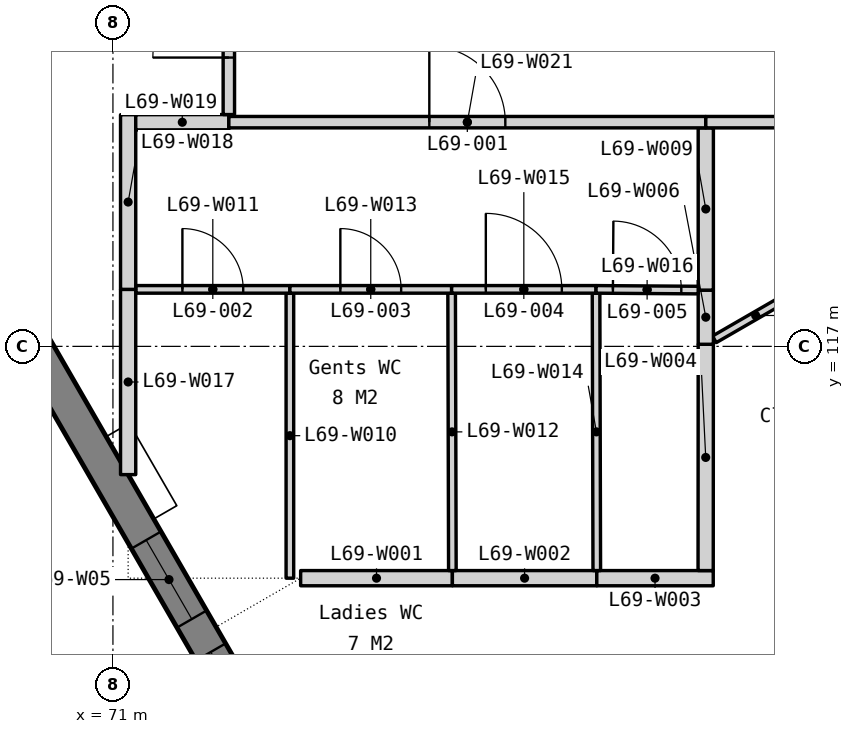
"""IFC4 building model, lengths in metres.
Left out: names, types, materials, properties, quantities, classifications, styles, units other than length and angle.
Written with IfcOpenShell. Run it as: python <this file> out.ifc"""

import sys

from ifc_helpers import new_model, si_unit, direction, frame, frame_2d, origin, place, context, subcontext, project, spatial, polyline, rectangle, outline, extrude, element, fill, save


model = new_model("IFC4")
c1 = context("Model", 3, precision=1e-05, world=origin(), true_north=direction((0.0, 1.0)))
c2 = subcontext(c1, "Body", "Model", "MODEL_VIEW")
j1 = project(units=[si_unit("LENGTHUNIT", "METRE"), si_unit("PLANEANGLEUNIT", "RADIAN")], contexts=[c1])
p1 = place(None, origin())
s1 = spatial("IfcSite", under=j1, at=p1, CompositionType="ELEMENT")
p2 = place(p1, origin())
s2 = spatial("IfcBuilding", under=s1, at=p2, CompositionType="ELEMENT")
p3 = place(p2, frame((0.0, 0.0, 281.6)))
s3 = spatial("IfcBuildingStorey", under=s2, at=p3, CompositionType="ELEMENT", Elevation=281.6)
p4 = place(p3, frame((60.609, 133.207, -0.15), z_axis=(0.0, 0.0, 1.0), x_axis=(0.500002536638, -0.866023939251, 0.0)))
e1 = element("IfcWall", 1, at=p4, inside=s3, PredefinedType="SOLIDWALL", context=c2, shape_type="SweptSolid", body=[
    extrude(outline(polyline([(36.972, 0.0), (36.972, 3.55), (0.0, 3.55), (0.0, 0.0), (36.972, 0.0)])), frame((0.0, 0.225, 0.0), z_axis=(0.0, -1.0, 0.0), x_axis=(1.0, 0.0, 0.0)), (0.0, 0.0, 1.0), 0.45),
])
p5 = place(p4, frame((3.172, 0.0, 0.95)))
e2 = element("IfcOpeningElement", 2, at=p5, cuts=e1, PredefinedType="OPENING", context=c2, shape_type="SweptSolid", body=[
    extrude(rectangle(XDim=1.2, YDim=2.2, at=frame_2d((0.6, 1.1))), frame((0.0, 0.235, 0.0), z_axis=(0.0, -1.0, 0.0), x_axis=(1.0, 0.0, 0.0)), (0.0, 0.0, 1.0), 0.47),
])
p6 = place(p4, frame((4.872, 0.0, 0.95)))
e3 = element("IfcOpeningElement", 3, at=p6, cuts=e1, PredefinedType="OPENING", context=c2, shape_type="SweptSolid", body=[
    extrude(rectangle(XDim=1.2, YDim=2.2, at=frame_2d((0.6, 1.1))), frame((0.0, 0.235, 0.0), z_axis=(0.0, -1.0, 0.0), x_axis=(1.0, 0.0, 0.0)), (0.0, 0.0, 1.0), 0.47),
])
p7 = place(p4, frame((12.415, 0.0, 0.95)))
e4 = element("IfcOpeningElement", 4, at=p7, cuts=e1, PredefinedType="OPENING", context=c2, shape_type="SweptSolid", body=[
    extrude(rectangle(XDim=1.2, YDim=2.2, at=frame_2d((0.6, 1.1))), frame((0.0, 0.235, 0.0), z_axis=(0.0, -1.0, 0.0), x_axis=(1.0, 0.0, 0.0)), (0.0, 0.0, 1.0), 0.47),
])
p8 = place(p4, frame((14.115, 0.0, 0.95)))
e5 = element("IfcOpeningElement", 5, at=p8, cuts=e1, PredefinedType="OPENING", context=c2, shape_type="SweptSolid", body=[
    extrude(rectangle(XDim=1.2, YDim=2.2, at=frame_2d((0.6, 1.1))), frame((0.0, 0.235, 0.0), z_axis=(0.0, -1.0, 0.0), x_axis=(1.0, 0.0, 0.0)), (0.0, 0.0, 1.0), 0.47),
])
p9 = place(p4, frame((21.658, 0.0, 0.95)))
e6 = element("IfcOpeningElement", 6, at=p9, cuts=e1, PredefinedType="OPENING", context=c2, shape_type="SweptSolid", body=[
    extrude(rectangle(XDim=1.2, YDim=2.2, at=frame_2d((0.6, 1.1))), frame((0.0, 0.235, 0.0), z_axis=(0.0, -1.0, 0.0), x_axis=(1.0, 0.0, 0.0)), (0.0, 0.0, 1.0), 0.47),
])
p10 = place(p4, frame((23.358, 0.0, 0.95)))
e7 = element("IfcOpeningElement", 7, at=p10, cuts=e1, PredefinedType="OPENING", context=c2, shape_type="SweptSolid", body=[
    extrude(rectangle(XDim=1.2, YDim=2.2, at=frame_2d((0.6, 1.1))), frame((0.0, 0.235, 0.0), z_axis=(0.0, -1.0, 0.0), x_axis=(1.0, 0.0, 0.0)), (0.0, 0.0, 1.0), 0.47),
])
p11 = place(p4, frame((30.901, 0.0, 0.95)))
e8 = element("IfcOpeningElement", 8, at=p11, cuts=e1, PredefinedType="OPENING", context=c2, shape_type="SweptSolid", body=[
    extrude(rectangle(XDim=1.2, YDim=2.2, at=frame_2d((0.6, 1.1))), frame((0.0, 0.235, 0.0), z_axis=(0.0, -1.0, 0.0), x_axis=(1.0, 0.0, 0.0)), (0.0, 0.0, 1.0), 0.47),
])
p12 = place(p4, frame((32.601, 0.0, 0.95)))
e9 = element("IfcOpeningElement", 9, at=p12, cuts=e1, PredefinedType="OPENING", context=c2, shape_type="SweptSolid", body=[
    extrude(rectangle(XDim=1.2, YDim=2.2, at=frame_2d((0.6, 1.1))), frame((0.0, 0.235, 0.0), z_axis=(0.0, -1.0, 0.0), x_axis=(1.0, 0.0, 0.0)), (0.0, 0.0, 1.0), 0.47),
])
p13 = place(p3, frame((73.47, 113.95, 0.0), z_axis=(0.0, 0.0, 1.0), x_axis=(1.0, 0.0, 0.0)))
e10 = element("IfcWall", 10, at=p13, inside=s3, PredefinedType="PARTITIONING", context=c2, shape_type="SweptSolid", body=[
    extrude(rectangle(XDim=1.996, YDim=0.2, at=frame_2d((0.998, 0.0))), origin(), (0.0, 0.0, 1.0), 3.5),
])
p14 = place(p3, frame((75.466, 113.95, 0.0), z_axis=(0.0, 0.0, 1.0), x_axis=(1.0, 0.0, 0.0)))
e11 = element("IfcWall", 11, at=p14, inside=s3, PredefinedType="PARTITIONING", context=c2, shape_type="SweptSolid", body=[
    extrude(rectangle(XDim=1.9, YDim=0.2, at=frame_2d((0.95, 0.0))), origin(), (0.0, 0.0, 1.0), 3.5),
])
p15 = place(p3, frame((77.366, 113.95, 0.0), z_axis=(0.0, 0.0, 1.0), x_axis=(1.0, 0.0, 0.0)))
e12 = element("IfcWall", 12, at=p15, inside=s3, PredefinedType="PARTITIONING", context=c2, shape_type="SweptSolid", body=[
    extrude(rectangle(XDim=1.532, YDim=0.2, at=frame_2d((0.766, 0.0))), origin(), (0.0, 0.0, 1.0), 3.5),
])
p16 = place(p3, frame((78.798, 114.05, 0.0), z_axis=(0.0, 0.0, 1.0), x_axis=(0.00065595263, 0.999999784863, 0.0)))
e13 = element("IfcWall", 13, at=p16, inside=s3, PredefinedType="PARTITIONING", context=c2, shape_type="SweptSolid", body=[
    extrude(rectangle(XDim=2.978, YDim=0.2, at=frame_2d((1.489, 0.0))), origin(), (0.0, 0.0, 1.0), 3.5),
])
p17 = place(p3, frame((78.913, 117.093, 0.0), z_axis=(0.0, 0.0, 1.0), x_axis=(0.866069023501, 0.499924440822, 0.0)))
e14 = element("IfcWall", 14, at=p17, inside=s3, PredefinedType="PARTITIONING", context=c2, shape_type="SweptSolid", body=[
    extrude(rectangle(XDim=1.256, YDim=0.1, at=frame_2d((0.628, 0.0))), origin(), (0.0, 0.0, 1.0), 3.5),
])
p18 = place(p3, frame((78.8, 117.028, 0.0), z_axis=(0.0, 0.0, 1.0), x_axis=(0.0, 1.0, 0.0)))
e15 = element("IfcWall", 15, at=p18, inside=s3, PredefinedType="PARTITIONING", context=c2, shape_type="SweptSolid", body=[
    extrude(rectangle(XDim=0.712, YDim=0.2, at=frame_2d((0.356, 0.0))), origin(), (0.0, 0.0, 1.0), 3.5),
])
p19 = place(p3, frame((78.8, 117.74, 0.0), z_axis=(0.0, 0.0, 1.0), x_axis=(0.0, 1.0, 0.0)))
e16 = element("IfcWall", 16, at=p19, inside=s3, PredefinedType="PARTITIONING", context=c2, shape_type="SweptSolid", body=[
    extrude(rectangle(XDim=2.135, YDim=0.2, at=frame_2d((1.067, 0.0))), origin(), (0.0, 0.0, 1.0), 3.5),
])
p20 = place(p3, frame((73.328, 113.95, 0.0), z_axis=(0.0, 0.0, 1.0), x_axis=(0.0, 1.0, 0.0)))
e17 = element("IfcWall", 17, at=p20, inside=s3, PredefinedType="PARTITIONING", context=c2, shape_type="SweptSolid", body=[
    extrude(rectangle(XDim=3.75, YDim=0.1, at=frame_2d((1.875, 0.0))), origin(), (0.0, 0.0, 1.0), 3.5),
])
p21 = place(p3, frame((71.3, 117.75, 0.0), z_axis=(0.0, 0.0, 1.0), x_axis=(1.0, 0.0, 0.0)))
e18 = element("IfcWall", 18, at=p21, inside=s3, PredefinedType="PARTITIONING", context=c2, shape_type="SweptSolid", body=[
    extrude(rectangle(XDim=2.028, YDim=0.1, at=frame_2d((1.014, 0.0))), origin(), (0.0, 0.0, 1.0), 3.5),
])
p22 = place(p21, frame((0.614, 0.0, 0.0)))
e19 = element("IfcOpeningElement", 19, at=p22, cuts=e18, PredefinedType="OPENING", context=c2, shape_type="SweptSolid", body=[
    extrude(rectangle(XDim=0.8, YDim=2.1, at=frame_2d((0.4, 1.05))), frame((0.0, 0.06, 0.0), z_axis=(0.0, -1.0, 0.0), x_axis=(1.0, 0.0, 0.0)), (0.0, 0.0, 1.0), 0.12),
])
p23 = place(p3, frame((75.466, 114.05, 0.0), z_axis=(0.0, 0.0, 1.0), x_axis=(-0.002675575707, 0.999996420641, 0.0)))
e20 = element("IfcWall", 20, at=p23, inside=s3, PredefinedType="PARTITIONING", context=c2, shape_type="SweptSolid", body=[
    extrude(rectangle(XDim=3.65, YDim=0.1, at=frame_2d((1.825, 0.0))), origin(), (0.0, 0.0, 1.0), 3.5),
])
p24 = place(p3, frame((73.328, 117.75, 0.0), z_axis=(0.0, 0.0, 1.0), x_axis=(1.0, 0.0, 0.0)))
e21 = element("IfcWall", 21, at=p24, inside=s3, PredefinedType="PARTITIONING", context=c2, shape_type="SweptSolid", body=[
    extrude(rectangle(XDim=2.128, YDim=0.1, at=frame_2d((1.064, 0.0))), origin(), (0.0, 0.0, 1.0), 3.5),
])
p25 = place(p24, frame((0.664, 0.0, 0.0)))
e22 = element("IfcOpeningElement", 22, at=p25, cuts=e21, PredefinedType="OPENING", context=c2, shape_type="SweptSolid", body=[
    extrude(rectangle(XDim=0.8, YDim=2.1, at=frame_2d((0.4, 1.05))), frame((0.0, 0.06, 0.0), z_axis=(0.0, -1.0, 0.0), x_axis=(1.0, 0.0, 0.0)), (0.0, 0.0, 1.0), 0.12),
])
p26 = place(p3, frame((77.366, 114.05, 0.0), z_axis=(0.0, 0.0, 1.0), x_axis=(-0.002608686776, 0.999996597371, 0.0)))
e23 = element("IfcWall", 23, at=p26, inside=s3, PredefinedType="PARTITIONING", context=c2, shape_type="SweptSolid", body=[
    extrude(rectangle(XDim=3.65, YDim=0.1, at=frame_2d((1.825, 0.0))), origin(), (0.0, 0.0, 1.0), 3.5),
])
p27 = place(p3, frame((75.456, 117.75, 0.0), z_axis=(0.0, 0.0, 1.0), x_axis=(1.0, 0.0, 0.0)))
e24 = element("IfcWall", 24, at=p27, inside=s3, PredefinedType="PARTITIONING", context=c2, shape_type="SweptSolid", body=[
    extrude(rectangle(XDim=1.9, YDim=0.1, at=frame_2d((0.95, 0.0))), origin(), (0.0, 0.0, 1.0), 3.5),
])
p28 = place(p27, frame((0.45, 0.0, 0.0)))
e25 = element("IfcOpeningElement", 25, at=p28, cuts=e24, PredefinedType="OPENING", context=c2, shape_type="SweptSolid", body=[
    extrude(rectangle(XDim=1.0, YDim=2.1, at=frame_2d((0.5, 1.05))), frame((0.0, 0.06, 0.0), z_axis=(0.0, -1.0, 0.0), x_axis=(1.0, 0.0, 0.0)), (0.0, 0.0, 1.0), 0.12),
])
p29 = place(p3, frame((77.356, 117.75, 0.0), z_axis=(0.0, 0.0, 1.0), x_axis=(0.99997617642, -0.006902651172, 0.0)))
e26 = element("IfcWall", 26, at=p29, inside=s3, PredefinedType="PARTITIONING", context=c2, shape_type="SweptSolid", body=[
    extrude(rectangle(XDim=1.344, YDim=0.1, at=frame_2d((0.672, 0.0))), origin(), (0.0, 0.0, 1.0), 3.5),
])
p30 = place(p29, frame((0.222, 0.0, 0.0)))
e27 = element("IfcOpeningElement", 27, at=p30, cuts=e26, PredefinedType="OPENING", context=c2, shape_type="SweptSolid", body=[
    extrude(rectangle(XDim=0.9, YDim=2.1, at=frame_2d((0.45, 1.05))), frame((0.0, 0.06, 0.0), z_axis=(0.0, -1.0, 0.0), x_axis=(1.0, 0.0, 0.0)), (0.0, 0.0, 1.0), 0.12),
])
p31 = place(p3, frame((71.2, 115.313, 0.0), z_axis=(0.0, 0.0, 1.0), x_axis=(0.0, 1.0, 0.0)))
e28 = element("IfcWall", 28, at=p31, inside=s3, PredefinedType="PARTITIONING", context=c2, shape_type="SweptSolid", body=[
    extrude(rectangle(XDim=2.437, YDim=0.2, at=frame_2d((1.219, 0.0))), origin(), (0.0, 0.0, 1.0), 2.878),
])
p32 = place(p3, frame((71.2, 117.75, 0.0), z_axis=(0.0, 0.0, 1.0), x_axis=(0.0, 1.0, 0.0)))
e29 = element("IfcWall", 29, at=p32, inside=s3, PredefinedType="PARTITIONING", context=c2, shape_type="SweptSolid", body=[
    extrude(rectangle(XDim=2.298, YDim=0.2, at=frame_2d((1.149, 0.0))), origin(), (0.0, 0.0, 1.0), 2.878),
])
p33 = place(p3, frame((71.3, 119.948, 0.0), z_axis=(0.0, 0.0, 1.0), x_axis=(0.999999026632, 0.001395254771, 0.0)))
e30 = element("IfcWall", 30, at=p33, inside=s3, PredefinedType="PARTITIONING", context=c2, shape_type="SweptSolid", body=[
    extrude(rectangle(XDim=1.225, YDim=0.2, at=frame_2d((0.612, 0.0))), origin(), (0.0, 0.0, 1.0), 3.5),
])
p34 = place(p3, frame((72.525, 120.05, 0.0), z_axis=(0.0, 0.0, 1.0), x_axis=(0.0, 1.0, 0.0)))
e31 = element("IfcWall", 31, at=p34, inside=s3, PredefinedType="PARTITIONING", context=c2, shape_type="SweptSolid", body=[
    extrude(rectangle(XDim=2.5, YDim=0.15, at=frame_2d((1.25, 0.0))), origin(), (0.0, 0.0, 1.0), 3.5),
])
p35 = place(p34, frame((0.75, 0.0, 0.0)))
e32 = element("IfcOpeningElement", 32, at=p35, cuts=e31, PredefinedType="OPENING", context=c2, shape_type="SweptSolid", body=[
    extrude(rectangle(XDim=1.0, YDim=2.1, at=frame_2d((0.5, 1.05))), frame((0.0, 0.085, 0.0), z_axis=(0.0, -1.0, 0.0), x_axis=(1.0, 0.0, 0.0)), (0.0, 0.0, 1.0), 0.17),
])
p36 = place(p3, frame((72.525, 119.95, 0.0), z_axis=(0.0, 0.0, 1.0), x_axis=(1.0, 0.0, 0.0)))
e33 = element("IfcWall", 33, at=p36, inside=s3, PredefinedType="PARTITIONING", context=c2, shape_type="SweptSolid", body=[
    extrude(rectangle(XDim=6.275, YDim=0.15, at=frame_2d((3.138, 0.0))), origin(), (0.0, 0.0, 1.0), 3.5),
])
p37 = place(p36, frame((2.637, 0.0, 0.0)))
e34 = element("IfcOpeningElement", 34, at=p37, cuts=e33, PredefinedType="OPENING", context=c2, shape_type="SweptSolid", body=[
    extrude(rectangle(XDim=1.0, YDim=2.1, at=frame_2d((0.5, 1.05))), frame((0.0, 0.085, 0.0), z_axis=(0.0, -1.0, 0.0), x_axis=(1.0, 0.0, 0.0)), (0.0, 0.0, 1.0), 0.17),
])
p38 = place(p3, frame((78.8, 119.95, 0.0), z_axis=(0.0, 0.0, 1.0), x_axis=(1.0, 0.0, 0.0)))
e35 = element("IfcWall", 35, at=p38, inside=s3, PredefinedType="PARTITIONING", context=c2, shape_type="SweptSolid", body=[
    extrude(rectangle(XDim=6.581, YDim=0.15, at=frame_2d((3.291, 0.0))), origin(), (0.0, 0.0, 1.0), 3.5),
])
p39 = place(p38, frame((2.791, 0.0, 0.0)))
e36 = element("IfcOpeningElement", 36, at=p39, cuts=e35, PredefinedType="OPENING", context=c2, shape_type="SweptSolid", body=[
    extrude(rectangle(XDim=1.0, YDim=2.1, at=frame_2d((0.5, 1.05))), frame((0.0, 0.085, 0.0), z_axis=(0.0, -1.0, 0.0), x_axis=(1.0, 0.0, 0.0)), (0.0, 0.0, 1.0), 0.17),
])
p40 = place(p9, origin())
e37 = element("IfcWindow", 37, at=p40, inside=s3, PartitioningType="SINGLE_PANEL", PredefinedType="WINDOW", context=c2, shape_type="SweptSolid", body=[
    extrude(rectangle(XDim=1.2, YDim=2.2, at=frame_2d((0.6, 1.1))), frame((0.0, 0.03, 0.0), z_axis=(0.0, -1.0, 0.0), x_axis=(1.0, 0.0, 0.0)), (0.0, 0.0, 1.0), 0.06),
])
fill(e6, e37)
p41 = place(p10, origin())
e38 = element("IfcWindow", 38, at=p41, inside=s3, PartitioningType="SINGLE_PANEL", PredefinedType="WINDOW", context=c2, shape_type="SweptSolid", body=[
    extrude(rectangle(XDim=1.2, YDim=2.2, at=frame_2d((0.6, 1.1))), frame((0.0, 0.03, 0.0), z_axis=(0.0, -1.0, 0.0), x_axis=(1.0, 0.0, 0.0)), (0.0, 0.0, 1.0), 0.06),
])
fill(e7, e38)
p42 = place(p37, origin())
e39 = element("IfcDoor", 39, at=p42, inside=s3, OperationType="SINGLE_SWING_LEFT", PredefinedType="DOOR", context=c2, shape_type="SweptSolid", body=[
    extrude(rectangle(XDim=1.0, YDim=2.1, at=frame_2d((0.5, 1.05))), frame((0.0, 0.025, 0.0), z_axis=(0.0, -1.0, 0.0), x_axis=(1.0, 0.0, 0.0)), (0.0, 0.0, 1.0), 0.05),
])
fill(e34, e39)
p43 = place(p22, origin())
e40 = element("IfcDoor", 40, at=p43, inside=s3, OperationType="SINGLE_SWING_LEFT", PredefinedType="DOOR", context=c2, shape_type="SweptSolid", body=[
    extrude(rectangle(XDim=0.8, YDim=2.1, at=frame_2d((0.4, 1.05))), frame((0.0, 0.025, 0.0), z_axis=(0.0, -1.0, 0.0), x_axis=(1.0, 0.0, 0.0)), (0.0, 0.0, 1.0), 0.05),
])
fill(e19, e40)
p44 = place(p25, origin())
e41 = element("IfcDoor", 41, at=p44, inside=s3, OperationType="SINGLE_SWING_LEFT", PredefinedType="DOOR", context=c2, shape_type="SweptSolid", body=[
    extrude(rectangle(XDim=0.8, YDim=2.1, at=frame_2d((0.4, 1.05))), frame((0.0, 0.025, 0.0), z_axis=(0.0, -1.0, 0.0), x_axis=(1.0, 0.0, 0.0)), (0.0, 0.0, 1.0), 0.05),
])
fill(e22, e41)
p45 = place(p28, origin())
e42 = element("IfcDoor", 42, at=p45, inside=s3, OperationType="SINGLE_SWING_LEFT", PredefinedType="DOOR", context=c2, shape_type="SweptSolid", body=[
    extrude(rectangle(XDim=1.0, YDim=2.1, at=frame_2d((0.5, 1.05))), frame((0.0, 0.025, 0.0), z_axis=(0.0, -1.0, 0.0), x_axis=(1.0, 0.0, 0.0)), (0.0, 0.0, 1.0), 0.05),
])
fill(e25, e42)
p46 = place(p30, origin())
e43 = element("IfcDoor", 43, at=p46, inside=s3, OperationType="SINGLE_SWING_LEFT", PredefinedType="DOOR", context=c2, shape_type="SweptSolid", body=[
    extrude(rectangle(XDim=0.9, YDim=2.1, at=frame_2d((0.45, 1.05))), frame((0.0, 0.025, 0.0), z_axis=(0.0, -1.0, 0.0), x_axis=(1.0, 0.0, 0.0)), (0.0, 0.0, 1.0), 0.05),
])
fill(e27, e43)
p47 = place(p35, origin())
e44 = element("IfcDoor", 44, at=p47, inside=s3, OperationType="SINGLE_SWING_LEFT", PredefinedType="DOOR", context=c2, shape_type="SweptSolid", body=[
    extrude(rectangle(XDim=1.0, YDim=2.1, at=frame_2d((0.5, 1.05))), frame((0.0, 0.025, 0.0), z_axis=(0.0, -1.0, 0.0), x_axis=(1.0, 0.0, 0.0)), (0.0, 0.0, 1.0), 0.05),
])
fill(e32, e44)
save(model, sys.argv[1])
